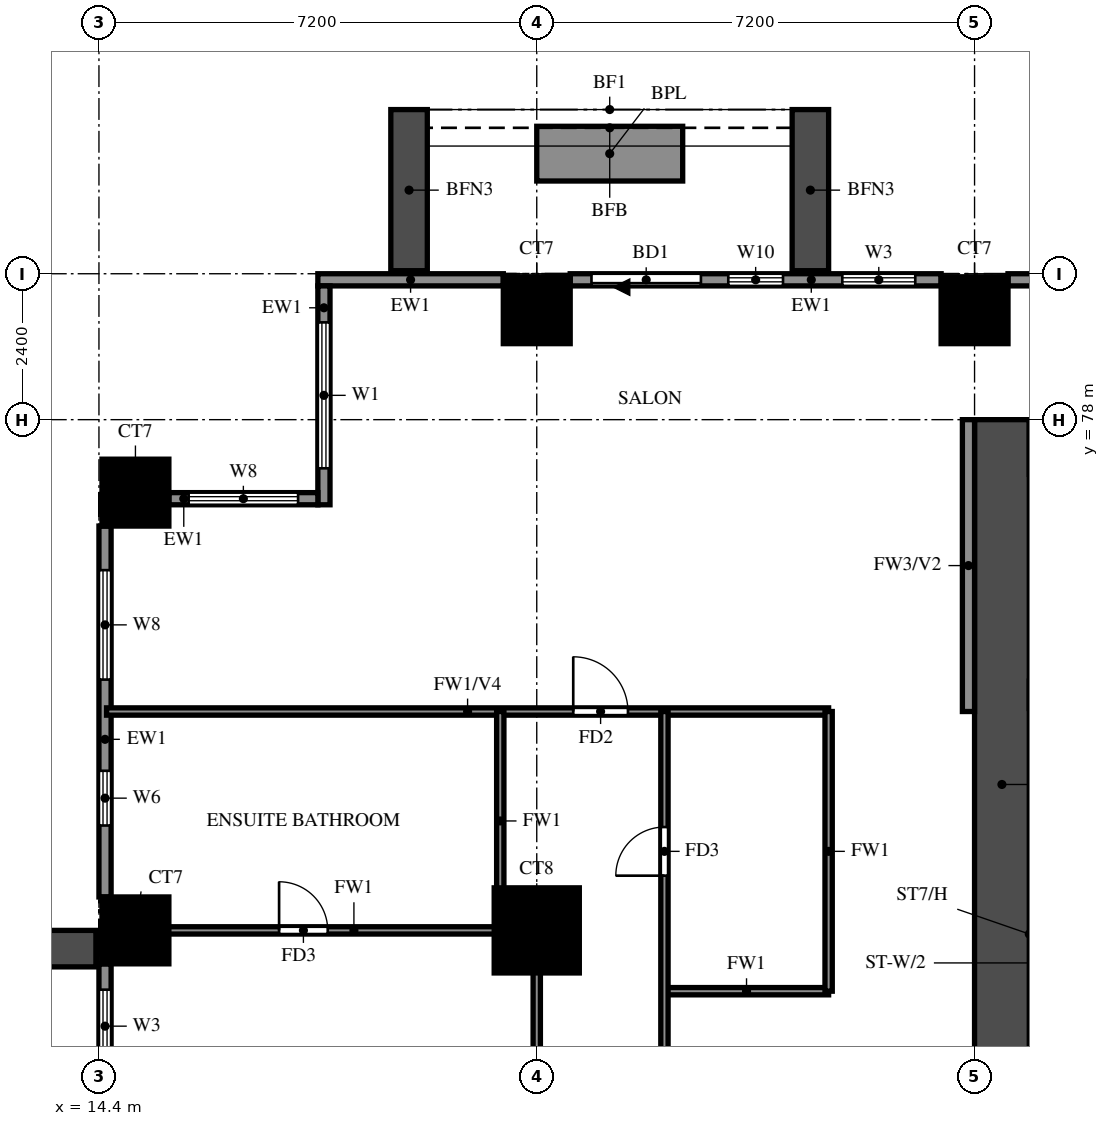
"""IFC4 building model, lengths in metres.
Left out: names, types, materials, properties, quantities, classifications, styles, units other than length and angle.
Written with IfcOpenShell. Run it as: python <this file> out.ifc"""

import sys

from ifc_helpers import new_model, si_unit, direction, frame, frame_2d, origin, origin_2d, place, context, subcontext, project, spatial, rectangle, extrude, source, transform, mapped, element, fill, save


model = new_model("IFC4")
c1 = context("Model", 3, precision=1e-05, world=origin(), true_north=direction((0.0, 1.0)))
c2 = subcontext(c1, "Body", "Model", "MODEL_VIEW")
j1 = project(units=[si_unit("LENGTHUNIT", "METRE"), si_unit("PLANEANGLEUNIT", "RADIAN")], contexts=[c1])
p1 = place(None, origin())
s1 = spatial("IfcSite", under=j1, at=p1, CompositionType="ELEMENT")
p2 = place(p1, origin())
s2 = spatial("IfcBuilding", under=s1, at=p2, CompositionType="ELEMENT")
p3 = place(p2, frame((0.0, 0.0, 58.5)))
s3 = spatial("IfcBuildingStorey", under=s2, at=p3, CompositionType="ELEMENT", Elevation=58.5)
m1 = source(origin(), c2, "Body", "SweptSolid", [
    extrude(rectangle(XDim=1.1, YDim=1.1, at=origin_2d()), origin(), (0.0, 0.0, 1.0), 3.18),
])
p4 = place(p3, frame((15.0, 69.6, 0.0), z_axis=(0.0, 0.0, 1.0), x_axis=(1.0, 0.0, 0.0)))
e1 = element("IfcColumn", 1, at=p4, inside=s3, PredefinedType="COLUMN", context=c2, shape_type="MappedRepresentation", body=[
    mapped(m1, transform((0.0, 0.0, 0.0))),
])
m2 = source(origin(), c2, "Body", "SweptSolid", [
    extrude(rectangle(XDim=1.4, YDim=1.4, at=origin_2d()), origin(), (0.0, 0.0, 1.0), 3.18),
])
p5 = place(p3, frame((21.6, 69.6, 0.0), z_axis=(0.0, 0.0, 1.0), x_axis=(1.0, 0.0, 0.0)))
e2 = element("IfcColumn", 2, at=p5, inside=s3, PredefinedType="COLUMN", context=c2, shape_type="MappedRepresentation", body=[
    mapped(m2, transform((0.0, 0.0, 0.0))),
])
for number, where, z_axis, x_axis in (
    (3, (15.0, 76.8, 0.0), (0.0, 0.0, 1.0), (1.0, 0.0, 0.0)),
    (4, (21.6, 79.8, 0.0), (0.0, 0.0, 1.0), (1.0, 0.0, 0.0)),
    (5, (28.8, 79.8, 0.0), (0.0, 0.0, 1.0), (1.0, 0.0, 0.0)),
):
    element("IfcColumn", number, at=place(p3, frame(where, z_axis=z_axis, x_axis=x_axis)), inside=s3, PredefinedType="COLUMN", context=c2, shape_type="MappedRepresentation", body=[
        mapped(m1, transform((0.0, 0.0, 0.0))),
    ])
p6 = place(p3, frame((29.25, 66.0, 0.0), z_axis=(0.0, 0.0, 1.0), x_axis=(0.0, 1.0, 0.0)))
e6 = element("IfcWall", 6, at=p6, inside=s3, PredefinedType="SHEAR", context=c2, shape_type="SweptSolid", body=[
    extrude(rectangle(XDim=12.0, YDim=0.9, at=frame_2d((6.0, 0.0))), origin(), (0.0, 0.0, 1.0), 3.18),
])
p7 = place(p3, frame((29.7, 73.475, 0.0), z_axis=(0.0, 0.0, 1.0), x_axis=(1.0, 0.0, 0.0)))
e7 = element("IfcWall", 7, at=p7, inside=s3, PredefinedType="SHEAR", context=c2, shape_type="SweptSolid", body=[
    extrude(rectangle(XDim=3.175, YDim=0.45, at=frame_2d((1.587, 0.0))), origin(), (0.0, 0.0, 1.0), 3.18),
])
p8 = place(p3, frame((35.45, 80.3, 0.0), z_axis=(0.0, 0.0, 1.0), x_axis=(-1.0, 0.0, 0.0)))
e8 = element("IfcWall", 8, at=p8, inside=s3, PredefinedType="SOLIDWALL", context=c2, shape_type="SweptSolid", body=[
    extrude(rectangle(XDim=6.1, YDim=0.2, at=frame_2d((3.05, 0.0))), origin(), (0.0, 0.0, 1.0), 3.18),
])
p9 = place(p3, frame((28.25, 80.3, 0.0), z_axis=(0.0, 0.0, 1.0), x_axis=(-1.0, 0.0, 0.0)))
e9 = element("IfcWall", 9, at=p9, inside=s3, PredefinedType="SOLIDWALL", context=c2, shape_type="SweptSolid", body=[
    extrude(rectangle(XDim=6.1, YDim=0.2, at=frame_2d((3.05, 0.0))), origin(), (0.0, 0.0, 1.0), 3.18),
])
p10 = place(p9, frame((3.95, 0.0, 0.0)))
e10 = element("IfcOpeningElement", 10, at=p10, cuts=e9, PredefinedType="OPENING", context=c2, shape_type="SweptSolid", body=[
    extrude(rectangle(XDim=1.8, YDim=2.4, at=frame_2d((0.9, 1.2))), frame((0.0, 0.11, 0.0), z_axis=(0.0, -1.0, 0.0), x_axis=(1.0, 0.0, 0.0)), (0.0, 0.0, 1.0), 0.22),
])
p11 = place(p9, frame((0.425, 0.0, 0.6)))
e11 = element("IfcOpeningElement", 11, at=p11, cuts=e9, PredefinedType="OPENING", context=c2, shape_type="SweptSolid", body=[
    extrude(rectangle(XDim=1.2, YDim=2.4, at=frame_2d((0.6, 1.2))), frame((0.0, 0.11, 0.0), z_axis=(0.0, -1.0, 0.0), x_axis=(1.0, 0.0, 0.0)), (0.0, 0.0, 1.0), 0.22),
])
p12 = place(p9, frame((2.6, 0.0, 0.6)))
e12 = element("IfcOpeningElement", 12, at=p12, cuts=e9, PredefinedType="OPENING", context=c2, shape_type="SweptSolid", body=[
    extrude(rectangle(XDim=0.9, YDim=2.4, at=frame_2d((0.45, 1.2))), frame((0.0, 0.11, 0.0), z_axis=(0.0, -1.0, 0.0), x_axis=(1.0, 0.0, 0.0)), (0.0, 0.0, 1.0), 0.22),
])
p13 = place(p3, frame((21.05, 80.3, 0.0), z_axis=(0.0, 0.0, 1.0), x_axis=(-1.0, 0.0, 0.0)))
e13 = element("IfcWall", 13, at=p13, inside=s3, PredefinedType="SOLIDWALL", context=c2, shape_type="SweptSolid", body=[
    extrude(rectangle(XDim=3.05, YDim=0.2, at=frame_2d((1.525, 0.0))), origin(), (0.0, 0.0, 1.0), 3.18),
])
p14 = place(p3, frame((18.1, 80.2, 0.0), z_axis=(0.0, 0.0, 1.0), x_axis=(0.0, -1.0, 0.0)))
e14 = element("IfcWall", 14, at=p14, inside=s3, PredefinedType="SOLIDWALL", context=c2, shape_type="SweptSolid", body=[
    extrude(rectangle(XDim=3.6, YDim=0.2, at=frame_2d((1.8, 0.0))), origin(), (0.0, 0.0, 1.0), 3.18),
])
p15 = place(p14, frame((0.6, 0.0, 0.6)))
e15 = element("IfcOpeningElement", 15, at=p15, cuts=e14, PredefinedType="OPENING", context=c2, shape_type="SweptSolid", body=[
    extrude(rectangle(XDim=2.4, YDim=2.4, at=frame_2d((1.2, 1.2))), frame((0.0, 0.11, 0.0), z_axis=(0.0, -1.0, 0.0), x_axis=(1.0, 0.0, 0.0)), (0.0, 0.0, 1.0), 0.22),
])
p16 = place(p3, frame((18.0, 76.7, 0.0), z_axis=(0.0, 0.0, 1.0), x_axis=(-1.0, 0.0, 0.0)))
e16 = element("IfcWall", 16, at=p16, inside=s3, PredefinedType="SOLIDWALL", context=c2, shape_type="SweptSolid", body=[
    extrude(rectangle(XDim=2.45, YDim=0.2, at=frame_2d((1.225, 0.0))), origin(), (0.0, 0.0, 1.0), 3.18),
])
p17 = place(p16, frame((0.325, 0.0, 0.6)))
e17 = element("IfcOpeningElement", 17, at=p17, cuts=e16, PredefinedType="OPENING", context=c2, shape_type="SweptSolid", body=[
    extrude(rectangle(XDim=1.8, YDim=2.4, at=frame_2d((0.9, 1.2))), frame((0.0, 0.11, 0.0), z_axis=(0.0, -1.0, 0.0), x_axis=(1.0, 0.0, 0.0)), (0.0, 0.0, 1.0), 0.22),
])
p18 = place(p3, frame((14.5, 76.25, 0.0), z_axis=(0.0, 0.0, 1.0), x_axis=(0.0, -1.0, 0.0)))
e18 = element("IfcWall", 18, at=p18, inside=s3, PredefinedType="SOLIDWALL", context=c2, shape_type="SweptSolid", body=[
    extrude(rectangle(XDim=6.1, YDim=0.2, at=frame_2d((3.05, 0.0))), origin(), (0.0, 0.0, 1.0), 3.18),
])
p19 = place(p18, frame((4.025, 0.0, 1.5)))
e19 = element("IfcOpeningElement", 19, at=p19, cuts=e18, PredefinedType="OPENING", context=c2, shape_type="SweptSolid", body=[
    extrude(rectangle(XDim=0.9, YDim=0.9, at=frame_2d((0.45, 0.45))), frame((0.0, 0.11, 0.0), z_axis=(0.0, -1.0, 0.0), x_axis=(1.0, 0.0, 0.0)), (0.0, 0.0, 1.0), 0.22),
])
p20 = place(p18, frame((0.725, 0.0, 0.6)))
e20 = element("IfcOpeningElement", 20, at=p20, cuts=e18, PredefinedType="OPENING", context=c2, shape_type="SweptSolid", body=[
    extrude(rectangle(XDim=1.8, YDim=2.4, at=frame_2d((0.9, 1.2))), frame((0.0, 0.11, 0.0), z_axis=(0.0, -1.0, 0.0), x_axis=(1.0, 0.0, 0.0)), (0.0, 0.0, 1.0), 0.22),
])
p21 = place(p3, frame((14.5, 69.05, 0.0), z_axis=(0.0, 0.0, 1.0), x_axis=(0.0, -1.0, 0.0)))
e21 = element("IfcWall", 21, at=p21, inside=s3, PredefinedType="SOLIDWALL", context=c2, shape_type="SweptSolid", body=[
    extrude(rectangle(XDim=6.1, YDim=0.2, at=frame_2d((3.05, 0.0))), origin(), (0.0, 0.0, 1.0), 3.18),
])
p22 = place(p21, frame((2.15, 0.0, 0.0)))
e22 = element("IfcOpeningElement", 22, at=p22, cuts=e21, PredefinedType="OPENING", context=c2, shape_type="SweptSolid", body=[
    extrude(rectangle(XDim=1.8, YDim=2.4, at=frame_2d((0.9, 1.2))), frame((0.0, 0.11, 0.0), z_axis=(0.0, -1.0, 0.0), x_axis=(1.0, 0.0, 0.0)), (0.0, 0.0, 1.0), 0.22),
])
p23 = place(p21, frame((0.425, 0.0, 0.6)))
e23 = element("IfcOpeningElement", 23, at=p23, cuts=e21, PredefinedType="OPENING", context=c2, shape_type="SweptSolid", body=[
    extrude(rectangle(XDim=1.2, YDim=2.4, at=frame_2d((0.6, 1.2))), frame((0.0, 0.11, 0.0), z_axis=(0.0, -1.0, 0.0), x_axis=(1.0, 0.0, 0.0)), (0.0, 0.0, 1.0), 0.22),
])
p24 = place(p21, frame((4.475, 0.0, 0.6)))
e24 = element("IfcOpeningElement", 24, at=p24, cuts=e21, PredefinedType="OPENING", context=c2, shape_type="SweptSolid", body=[
    extrude(rectangle(XDim=1.2, YDim=2.4, at=frame_2d((0.6, 1.2))), frame((0.0, 0.11, 0.0), z_axis=(0.0, -1.0, 0.0), x_axis=(1.0, 0.0, 0.0)), (0.0, 0.0, 1.0), 0.22),
])
for number, where, z_axis, x_axis in (
    (25, (26.1, 80.45, 0.0), (0.0, 0.0, 1.0), (0.0, 1.0, 0.0)),
    (26, (19.5, 80.45, 0.0), (0.0, 0.0, 1.0), (0.0, 1.0, 0.0)),
):
    element("IfcWall", number, at=place(p3, frame(where, z_axis=z_axis, x_axis=x_axis)), inside=s3, PredefinedType="SOLIDWALL", context=c2, shape_type="SweptSolid", body=[
        extrude(rectangle(XDim=2.65, YDim=0.6, at=frame_2d((1.325, 0.0))), origin(), (0.0, 0.0, 1.0), 2.85),
    ])
p25 = place(p3, frame((24.0, 82.375, 0.0), z_axis=(0.0, 0.0, 1.0), x_axis=(-1.0, 0.0, 0.0)))
e27 = element("IfcWall", 27, at=p25, inside=s3, PredefinedType="SOLIDWALL", context=c2, shape_type="SweptSolid", body=[
    extrude(rectangle(XDim=2.4, YDim=0.9, at=frame_2d((1.2, 0.0))), origin(), (0.0, 0.0, 1.0), 0.9),
])
p26 = place(p3, frame((14.35, 69.3, 0.0), z_axis=(0.0, 0.0, 1.0), x_axis=(-1.0, 0.0, 0.0)))
e28 = element("IfcWall", 28, at=p26, inside=s3, PredefinedType="SOLIDWALL", context=c2, shape_type="SweptSolid", body=[
    extrude(rectangle(XDim=2.65, YDim=0.6, at=frame_2d((1.325, 0.0))), origin(), (0.0, 0.0, 1.0), 2.85),
])
p27 = place(p3, frame((28.7, 73.2, 0.0), z_axis=(0.0, 0.0, 1.0), x_axis=(0.0, 1.0, 0.0)))
e29 = element("IfcWall", 29, at=p27, inside=s3, PredefinedType="SOLIDWALL", context=c2, shape_type="SweptSolid", body=[
    extrude(rectangle(XDim=4.8, YDim=0.2, at=frame_2d((2.4, 0.0))), origin(), (0.0, 0.0, 1.0), 3.18),
])
p28 = place(p3, frame((23.7, 68.6, 0.0), z_axis=(0.0, 0.0, 1.0), x_axis=(1.0, 0.0, 0.0)))
e30 = element("IfcWall", 30, at=p28, inside=s3, PredefinedType="PARTITIONING", context=c2, shape_type="SweptSolid", body=[
    extrude(rectangle(XDim=2.7, YDim=0.12, at=frame_2d((1.35, 0.0))), origin(), (0.0, 0.0, 1.0), 3.18),
])
p29 = place(p3, frame((14.525, 69.6, 0.0), z_axis=(0.0, 0.0, 1.0), x_axis=(1.0, 0.0, 0.0)))
e31 = element("IfcWall", 31, at=p29, inside=s3, PredefinedType="PARTITIONING", context=c2, shape_type="SweptSolid", body=[
    extrude(rectangle(XDim=7.075, YDim=0.12, at=frame_2d((3.538, 0.0))), origin(), (0.0, 0.0, 1.0), 3.18),
])
p30 = place(p29, frame((2.837, 0.0, 0.0)))
e32 = element("IfcOpeningElement", 32, at=p30, cuts=e31, PredefinedType="OPENING", context=c2, shape_type="SweptSolid", body=[
    extrude(rectangle(XDim=0.8, YDim=2.1, at=frame_2d((0.4, 1.05))), frame((0.0, 0.07, 0.0), z_axis=(0.0, -1.0, 0.0), x_axis=(1.0, 0.0, 0.0)), (0.0, 0.0, 1.0), 0.14),
])
p31 = place(p3, frame((14.525, 73.2, 0.0), z_axis=(0.0, 0.0, 1.0), x_axis=(1.0, 0.0, 0.0)))
e33 = element("IfcWall", 33, at=p31, inside=s3, PredefinedType="PARTITIONING", context=c2, shape_type="SweptSolid", body=[
    extrude(rectangle(XDim=11.875, YDim=0.12, at=frame_2d((5.938, 0.0))), origin(), (0.0, 0.0, 1.0), 2.28),
])
p32 = place(p31, frame((7.675, 0.0, 0.0)))
e34 = element("IfcOpeningElement", 34, at=p32, cuts=e33, PredefinedType="OPENING", context=c2, shape_type="SweptSolid", body=[
    extrude(rectangle(XDim=0.9, YDim=2.1, at=frame_2d((0.45, 1.05))), frame((0.0, 0.07, 0.0), z_axis=(0.0, -1.0, 0.0), x_axis=(1.0, 0.0, 0.0)), (0.0, 0.0, 1.0), 0.14),
])
p33 = place(p3, frame((21.0, 69.6, 0.0), z_axis=(0.0, 0.0, 1.0), x_axis=(0.0, 1.0, 0.0)))
e35 = element("IfcWall", 35, at=p33, inside=s3, PredefinedType="PARTITIONING", context=c2, shape_type="SweptSolid", body=[
    extrude(rectangle(XDim=3.6, YDim=0.12, at=frame_2d((1.8, 0.0))), origin(), (0.0, 0.0, 1.0), 3.18),
])
p34 = place(p3, frame((21.6, 55.2, 0.0), z_axis=(0.0, 0.0, 1.0), x_axis=(0.0, 1.0, 0.0)))
e36 = element("IfcWall", 36, at=p34, inside=s3, PredefinedType="PARTITIONING", context=c2, shape_type="SweptSolid", body=[
    extrude(rectangle(XDim=14.4, YDim=0.12, at=frame_2d((7.2, 0.0))), origin(), (0.0, 0.0, 1.0), 3.18),
])
p35 = place(p34, frame((1.05, 0.0, 0.0)))
e37 = element("IfcOpeningElement", 37, at=p35, cuts=e36, PredefinedType="OPENING", context=c2, shape_type="SweptSolid", body=[
    extrude(rectangle(XDim=1.5, YDim=2.1, at=frame_2d((0.75, 1.05))), frame((0.0, 0.07, 0.0), z_axis=(0.0, -1.0, 0.0), x_axis=(1.0, 0.0, 0.0)), (0.0, 0.0, 1.0), 0.14),
])
p36 = place(p34, frame((4.95, 0.0, 0.0)))
e38 = element("IfcOpeningElement", 38, at=p36, cuts=e36, PredefinedType="OPENING", context=c2, shape_type="SweptSolid", body=[
    extrude(rectangle(XDim=0.9, YDim=2.1, at=frame_2d((0.45, 1.05))), frame((0.0, 0.07, 0.0), z_axis=(0.0, -1.0, 0.0), x_axis=(1.0, 0.0, 0.0)), (0.0, 0.0, 1.0), 0.14),
])
p37 = place(p34, frame((10.35, 0.0, 0.0)))
e39 = element("IfcOpeningElement", 39, at=p37, cuts=e36, PredefinedType="OPENING", context=c2, shape_type="SweptSolid", body=[
    extrude(rectangle(XDim=0.9, YDim=2.1, at=frame_2d((0.45, 1.05))), frame((0.0, 0.07, 0.0), z_axis=(0.0, -1.0, 0.0), x_axis=(1.0, 0.0, 0.0)), (0.0, 0.0, 1.0), 0.14),
])
p38 = place(p3, frame((23.7, 61.2, 0.0), z_axis=(0.0, 0.0, 1.0), x_axis=(0.0, 1.0, 0.0)))
e40 = element("IfcWall", 40, at=p38, inside=s3, PredefinedType="PARTITIONING", context=c2, shape_type="SweptSolid", body=[
    extrude(rectangle(XDim=12.0, YDim=0.12, at=frame_2d((6.0, 0.0))), origin(), (0.0, 0.0, 1.0), 3.18),
])
p39 = place(p38, frame((4.55, 0.0, 0.0)))
e41 = element("IfcOpeningElement", 41, at=p39, cuts=e40, PredefinedType="OPENING", context=c2, shape_type="SweptSolid", body=[
    extrude(rectangle(XDim=0.9, YDim=2.1, at=frame_2d((0.45, 1.05))), frame((0.0, 0.07, 0.0), z_axis=(0.0, -1.0, 0.0), x_axis=(1.0, 0.0, 0.0)), (0.0, 0.0, 1.0), 0.14),
])
p40 = place(p38, frame((9.3, 0.0, 0.0)))
e42 = element("IfcOpeningElement", 42, at=p40, cuts=e40, PredefinedType="OPENING", context=c2, shape_type="SweptSolid", body=[
    extrude(rectangle(XDim=0.8, YDim=2.1, at=frame_2d((0.4, 1.05))), frame((0.0, 0.07, 0.0), z_axis=(0.0, -1.0, 0.0), x_axis=(1.0, 0.0, 0.0)), (0.0, 0.0, 1.0), 0.14),
])
p41 = place(p3, frame((26.4, 68.6, 0.0), z_axis=(0.0, 0.0, 1.0), x_axis=(0.0, 1.0, 0.0)))
e43 = element("IfcWall", 43, at=p41, inside=s3, PredefinedType="PARTITIONING", context=c2, shape_type="SweptSolid", body=[
    extrude(rectangle(XDim=4.6, YDim=0.12, at=frame_2d((2.3, 0.0))), origin(), (0.0, 0.0, 1.0), 3.18),
])
p42 = place(p10, origin())
e44 = element("IfcDoor", 44, at=p42, inside=s3, OperationType="DOUBLE_DOOR_SLIDING", PredefinedType="DOOR", context=c2, shape_type="SweptSolid", body=[
    extrude(rectangle(XDim=1.8, YDim=2.4, at=frame_2d((0.9, 1.2))), frame((0.0, 0.025, 0.0), z_axis=(0.0, -1.0, 0.0), x_axis=(1.0, 0.0, 0.0)), (0.0, 0.0, 1.0), 0.05),
])
fill(e10, e44)
p43 = place(p11, origin())
e45 = element("IfcWindow", 45, at=p43, inside=s3, PartitioningType="SINGLE_PANEL", PredefinedType="WINDOW", context=c2, shape_type="SweptSolid", body=[
    extrude(rectangle(XDim=1.2, YDim=2.4, at=frame_2d((0.6, 1.2))), frame((0.0, 0.03, 0.0), z_axis=(0.0, -1.0, 0.0), x_axis=(1.0, 0.0, 0.0)), (0.0, 0.0, 1.0), 0.06),
])
fill(e11, e45)
p44 = place(p12, origin())
e46 = element("IfcWindow", 46, at=p44, inside=s3, PartitioningType="SINGLE_PANEL", PredefinedType="WINDOW", context=c2, shape_type="SweptSolid", body=[
    extrude(rectangle(XDim=0.9, YDim=2.4, at=frame_2d((0.45, 1.2))), frame((0.0, 0.03, 0.0), z_axis=(0.0, -1.0, 0.0), x_axis=(1.0, 0.0, 0.0)), (0.0, 0.0, 1.0), 0.06),
])
fill(e12, e46)
p45 = place(p15, origin())
e47 = element("IfcWindow", 47, at=p45, inside=s3, PartitioningType="DOUBLE_PANEL_VERTICAL", PredefinedType="WINDOW", context=c2, shape_type="SweptSolid", body=[
    extrude(rectangle(XDim=2.4, YDim=2.4, at=frame_2d((1.2, 1.2))), frame((0.0, 0.03, 0.0), z_axis=(0.0, -1.0, 0.0), x_axis=(1.0, 0.0, 0.0)), (0.0, 0.0, 1.0), 0.06),
])
fill(e15, e47)
p46 = place(p17, origin())
e48 = element("IfcWindow", 48, at=p46, inside=s3, PartitioningType="DOUBLE_PANEL_VERTICAL", PredefinedType="WINDOW", context=c2, shape_type="SweptSolid", body=[
    extrude(rectangle(XDim=1.8, YDim=2.4, at=frame_2d((0.9, 1.2))), frame((0.0, 0.03, 0.0), z_axis=(0.0, -1.0, 0.0), x_axis=(1.0, 0.0, 0.0)), (0.0, 0.0, 1.0), 0.06),
])
fill(e17, e48)
p47 = place(p19, origin())
e49 = element("IfcWindow", 49, at=p47, inside=s3, PartitioningType="SINGLE_PANEL", PredefinedType="WINDOW", context=c2, shape_type="SweptSolid", body=[
    extrude(rectangle(XDim=0.9, YDim=0.9, at=frame_2d((0.45, 0.45))), frame((0.0, 0.03, 0.0), z_axis=(0.0, -1.0, 0.0), x_axis=(1.0, 0.0, 0.0)), (0.0, 0.0, 1.0), 0.06),
])
fill(e19, e49)
p48 = place(p20, origin())
e50 = element("IfcWindow", 50, at=p48, inside=s3, PartitioningType="DOUBLE_PANEL_VERTICAL", PredefinedType="WINDOW", context=c2, shape_type="SweptSolid", body=[
    extrude(rectangle(XDim=1.8, YDim=2.4, at=frame_2d((0.9, 1.2))), frame((0.0, 0.03, 0.0), z_axis=(0.0, -1.0, 0.0), x_axis=(1.0, 0.0, 0.0)), (0.0, 0.0, 1.0), 0.06),
])
fill(e20, e50)
p49 = place(p23, origin())
e51 = element("IfcWindow", 51, at=p49, inside=s3, PartitioningType="SINGLE_PANEL", PredefinedType="WINDOW", context=c2, shape_type="SweptSolid", body=[
    extrude(rectangle(XDim=1.2, YDim=2.4, at=frame_2d((0.6, 1.2))), frame((0.0, 0.03, 0.0), z_axis=(0.0, -1.0, 0.0), x_axis=(1.0, 0.0, 0.0)), (0.0, 0.0, 1.0), 0.06),
])
fill(e23, e51)
p50 = place(p30, origin())
e52 = element("IfcDoor", 52, at=p50, inside=s3, OperationType="SINGLE_SWING_LEFT", PredefinedType="DOOR", context=c2, shape_type="SweptSolid", body=[
    extrude(rectangle(XDim=0.8, YDim=2.1, at=frame_2d((0.4, 1.05))), frame((0.0, 0.025, 0.0), z_axis=(0.0, -1.0, 0.0), x_axis=(1.0, 0.0, 0.0)), (0.0, 0.0, 1.0), 0.05),
])
fill(e32, e52)
p51 = place(p32, origin())
e53 = element("IfcDoor", 53, at=p51, inside=s3, OperationType="SINGLE_SWING_RIGHT", PredefinedType="DOOR", context=c2, shape_type="SweptSolid", body=[
    extrude(rectangle(XDim=0.9, YDim=2.1, at=frame_2d((0.45, 1.05))), frame((0.0, 0.025, 0.0), z_axis=(0.0, -1.0, 0.0), x_axis=(1.0, 0.0, 0.0)), (0.0, 0.0, 1.0), 0.05),
])
fill(e34, e53)
p52 = place(p40, origin())
e54 = element("IfcDoor", 54, at=p52, inside=s3, OperationType="SINGLE_SWING_RIGHT", PredefinedType="DOOR", context=c2, shape_type="SweptSolid", body=[
    extrude(rectangle(XDim=0.8, YDim=2.1, at=frame_2d((0.4, 1.05))), frame((0.0, 0.025, 0.0), z_axis=(0.0, -1.0, 0.0), x_axis=(1.0, 0.0, 0.0)), (0.0, 0.0, 1.0), 0.05),
])
fill(e42, e54)
save(model, sys.argv[1])
